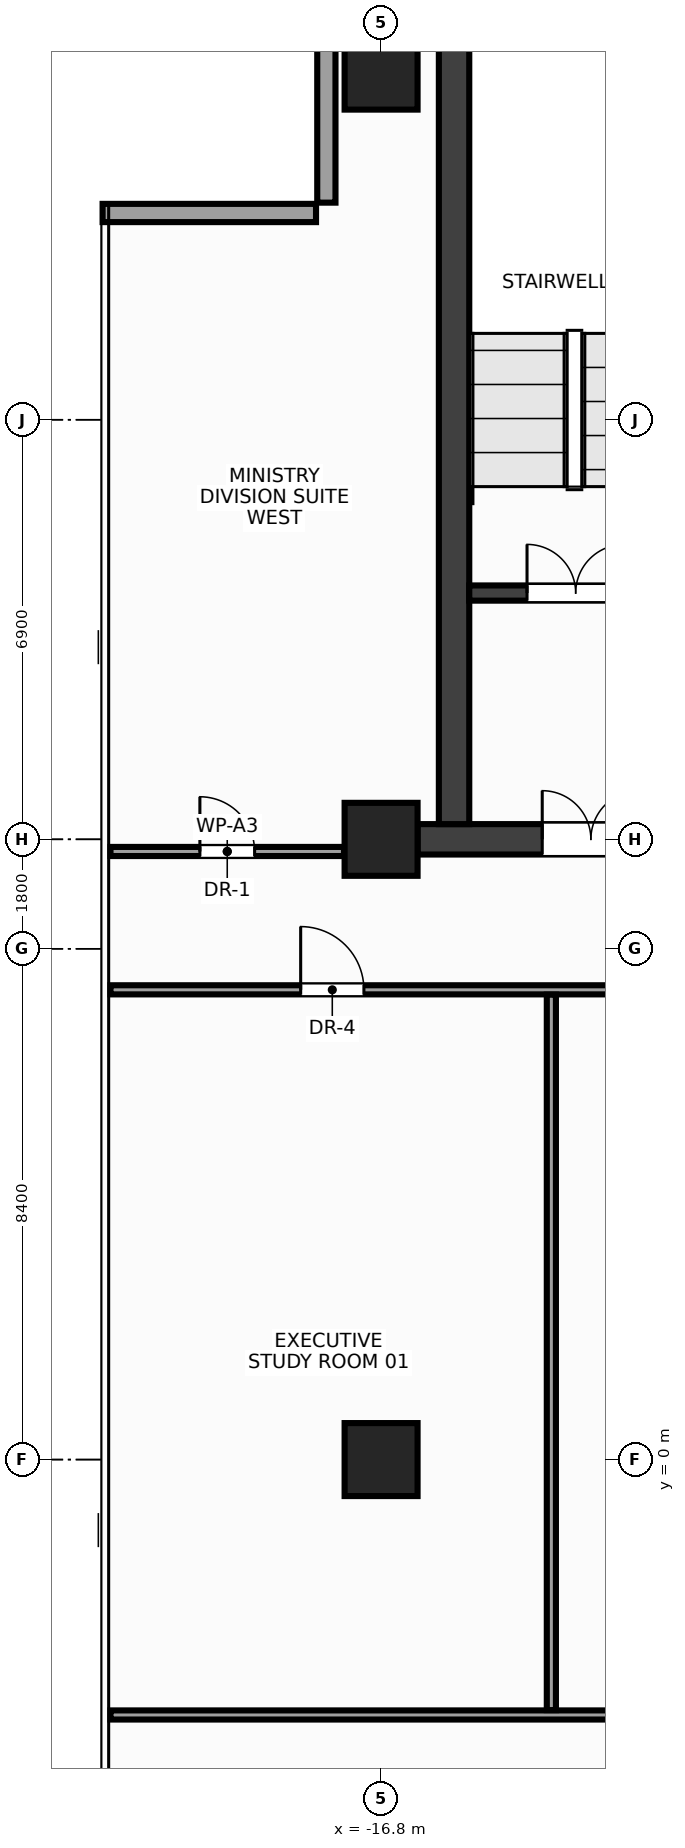
"""IFC4 building model, lengths in metres.
Left out: names, types, materials, properties, quantities, classifications, styles, units other than length and angle.
Written with IfcOpenShell. Run it as: python <this file> out.ifc"""

import sys

from ifc_helpers import new_model, si_unit, direction, frame, frame_2d, origin, origin_2d, place, context, subcontext, project, spatial, rectangle, extrude, source, transform, mapped, element, fill, save


model = new_model("IFC4")
c1 = context("Model", 3, precision=1e-05, world=origin(), true_north=direction((0.0, 1.0)))
c2 = subcontext(c1, "Body", "Model", "MODEL_VIEW")
j1 = project(units=[si_unit("LENGTHUNIT", "METRE"), si_unit("PLANEANGLEUNIT", "RADIAN")], contexts=[c1])
p1 = place(None, origin())
s1 = spatial("IfcSite", under=j1, at=p1, CompositionType="ELEMENT")
p2 = place(p1, origin())
s2 = spatial("IfcBuilding", under=s1, at=p2, CompositionType="ELEMENT")
p3 = place(p2, frame((0.0, 0.0, 279.2)))
s3 = spatial("IfcBuildingStorey", under=s2, at=p3, CompositionType="ELEMENT", Elevation=279.2)
m1 = source(origin(), c2, "Body", "SweptSolid", [
    extrude(rectangle(XDim=32.4, YDim=0.5, at=frame_2d((16.2, 0.0))), origin(), (0.0, 0.0, 1.0), 3.6),
])
p4 = place(p3, frame((-16.2, 10.2, 0.0), z_axis=(0.0, 0.0, 1.0), x_axis=(1.0, 0.0, 0.0)))
e1 = element("IfcWall", 1, at=p4, inside=s3, PredefinedType="SHEAR", context=c2, shape_type="MappedRepresentation", body=[
    mapped(m1, transform((0.0, 0.0, 0.0), x_axis=(1.0, 0.0, 0.0), y_axis=(0.0, 1.0, 0.0), z_axis=(0.0, 0.0, 1.0), scale=1.0)),
])
p5 = place(p4, frame((2.05, 0.0, 0.0)))
e2 = element("IfcOpeningElement", 2, at=p5, cuts=e1, PredefinedType="OPENING", context=c2, shape_type="SweptSolid", body=[
    extrude(rectangle(XDim=1.6, YDim=2.15, at=frame_2d((0.8, 1.075))), frame((0.0, 0.262, 0.0), z_axis=(0.0, -1.0, 0.0), x_axis=(1.0, 0.0, 0.0)), (0.0, 0.0, 1.0), 0.524),
])
p6 = place(p4, frame((28.75, 0.0, 0.0)))
e3 = element("IfcOpeningElement", 3, at=p6, cuts=e1, PredefinedType="OPENING", context=c2, shape_type="SweptSolid", body=[
    extrude(rectangle(XDim=1.6, YDim=2.15, at=frame_2d((0.8, 1.075))), frame((0.0, 0.262, 0.0), z_axis=(0.0, -1.0, 0.0), x_axis=(1.0, 0.0, 0.0)), (0.0, 0.0, 1.0), 0.524),
])
p7 = place(p4, frame((15.45, 0.0, 0.0)))
e4 = element("IfcOpeningElement", 4, at=p7, cuts=e1, PredefinedType="OPENING", context=c2, shape_type="SweptSolid", body=[
    extrude(rectangle(XDim=1.5, YDim=2.2, at=frame_2d((0.75, 1.1))), frame((0.0, 0.262, 0.0), z_axis=(0.0, -1.0, 0.0), x_axis=(1.0, 0.0, 0.0)), (0.0, 0.0, 1.0), 0.524),
])
m2 = source(origin(), c2, "Body", "SweptSolid", [
    extrude(rectangle(XDim=13.1, YDim=0.5, at=frame_2d((6.55, 0.0))), origin(), (0.0, 0.0, 1.0), 3.6),
])
p8 = place(p3, frame((-15.6, 10.45, 0.0), z_axis=(0.0, 0.0, 1.0), x_axis=(0.0, 1.0, 0.0)))
e5 = element("IfcWall", 5, at=p8, inside=s3, PredefinedType="SHEAR", context=c2, shape_type="MappedRepresentation", body=[
    mapped(m2, transform((0.0, 0.0, 0.0), x_axis=(1.0, 0.0, 0.0), y_axis=(0.0, 1.0, 0.0), z_axis=(0.0, 0.0, 1.0), scale=1.0)),
])
m3 = source(origin(), c2, "Body", "SweptSolid", [
    extrude(rectangle(XDim=3.705, YDim=0.25, at=frame_2d((1.853, 0.0))), origin(), (0.0, 0.0, 1.0), 3.6),
])
p9 = place(p3, frame((-15.35, 14.25, 0.0), z_axis=(0.0, 0.0, 1.0), x_axis=(1.0, 0.0, 0.0)))
e6 = element("IfcWall", 6, at=p9, inside=s3, PredefinedType="SHEAR", context=c2, shape_type="MappedRepresentation", body=[
    mapped(m3, transform((0.0, 0.0, 0.0), x_axis=(1.0, 0.0, 0.0), y_axis=(0.0, 1.0, 0.0), z_axis=(0.0, 0.0, 1.0), scale=1.0)),
])
p10 = place(p9, frame((0.95, 0.0, 0.0)))
e7 = element("IfcOpeningElement", 7, at=p10, cuts=e6, PredefinedType="OPENING", context=c2, shape_type="SweptSolid", body=[
    extrude(rectangle(XDim=1.6, YDim=2.15, at=frame_2d((0.8, 1.075))), frame((0.0, 0.137, 0.0), z_axis=(0.0, -1.0, 0.0), x_axis=(1.0, 0.0, 0.0)), (0.0, 0.0, 1.0), 0.274),
])
m4 = source(origin(), c2, "Body", "SweptSolid", [
    extrude(rectangle(XDim=1.2, YDim=1.2, at=origin_2d()), origin(), (0.0, 0.0, 1.0), 3.6),
])
for number, where, z_axis, x_axis in (
    (8, (-16.8, 0.0, 0.0), (0.0, 0.0, 1.0), (1.0, 0.0, 0.0)),
    (9, (-16.8, 10.2, 0.0), (0.0, 0.0, 1.0), (1.0, 0.0, 0.0)),
    (10, (-16.8, 22.8, 0.0), (0.0, 0.0, 1.0), (1.0, 0.0, 0.0)),
):
    element("IfcColumn", number, at=place(p3, frame(where, z_axis=z_axis, x_axis=x_axis)), inside=s3, PredefinedType="COLUMN", context=c2, shape_type="MappedRepresentation", body=[
        mapped(m4, transform((0.0, 0.0, 0.0), x_axis=(1.0, 0.0, 0.0), y_axis=(0.0, 1.0, 0.0), z_axis=(0.0, 0.0, 1.0), scale=1.0)),
    ])
m5 = source(origin(), c2, "Body", "SweptSolid", [
    extrude(rectangle(XDim=3.51, YDim=0.3, at=frame_2d((1.755, 0.0))), origin(), (0.0, 0.0, 1.0), 2.75),
])
p11 = place(p3, frame((-17.7, 24.18, 0.0), z_axis=(0.0, 0.0, 1.0), x_axis=(0.0, -1.0, 0.0)))
e11 = element("IfcWall", 11, at=p11, inside=s3, PredefinedType="STANDARD", context=c2, shape_type="MappedRepresentation", body=[
    mapped(m5, transform((0.0, 0.0, 0.0), x_axis=(1.0, 0.0, 0.0), y_axis=(0.0, 1.0, 0.0), z_axis=(0.0, 0.0, 1.0), scale=1.0)),
])
m6 = source(origin(), c2, "Body", "SweptSolid", [
    extrude(rectangle(XDim=3.51, YDim=0.3, at=frame_2d((1.755, 0.0))), origin(), (0.0, 0.0, 1.0), 2.75),
])
p12 = place(p3, frame((-17.87, 20.5, 0.0), z_axis=(0.0, 0.0, 1.0), x_axis=(-1.0, 0.0, 0.0)))
e12 = element("IfcWall", 12, at=p12, inside=s3, PredefinedType="STANDARD", context=c2, shape_type="MappedRepresentation", body=[
    mapped(m6, transform((0.0, 0.0, 0.0), x_axis=(1.0, 0.0, 0.0), y_axis=(0.0, 1.0, 0.0), z_axis=(0.0, 0.0, 1.0), scale=1.0)),
])
m7 = source(origin(), c2, "Body", "SweptSolid", [
    extrude(rectangle(XDim=3.84, YDim=0.15, at=frame_2d((1.92, 0.0))), origin(), (0.0, 0.0, 1.0), 2.805),
])
p13 = place(p3, frame((-21.25, 10.0, 0.0), z_axis=(0.0, 0.0, 1.0), x_axis=(1.0, 0.0, 0.0)))
e13 = element("IfcWall", 13, at=p13, inside=s3, PredefinedType="PARTITIONING", context=c2, shape_type="MappedRepresentation", body=[
    mapped(m7, transform((0.0, 0.0, 0.0), x_axis=(1.0, 0.0, 0.0), y_axis=(0.0, 1.0, 0.0), z_axis=(0.0, 0.0, 1.0), scale=1.0)),
])
p14 = place(p13, frame((1.47, 0.0, 0.0)))
e14 = element("IfcOpeningElement", 14, at=p14, cuts=e13, PredefinedType="OPENING", context=c2, shape_type="SweptSolid", body=[
    extrude(rectangle(XDim=0.9, YDim=2.15, at=frame_2d((0.45, 1.075))), frame((0.0, 0.087, 0.0), z_axis=(0.0, -1.0, 0.0), x_axis=(1.0, 0.0, 0.0)), (0.0, 0.0, 1.0), 0.174),
])
m8 = source(origin(), c2, "Body", "SweptSolid", [
    extrude(rectangle(XDim=16.9, YDim=0.15, at=frame_2d((8.45, 0.0))), origin(), (0.0, 0.0, 1.0), 2.755),
])
p15 = place(p3, frame((-21.25, 7.725, 0.0), z_axis=(0.0, 0.0, 1.0), x_axis=(1.0, 0.0, 0.0)))
e15 = element("IfcWall", 15, at=p15, inside=s3, PredefinedType="PARTITIONING", context=c2, shape_type="MappedRepresentation", body=[
    mapped(m8, transform((0.0, 0.0, 0.0), x_axis=(1.0, 0.0, 0.0), y_axis=(0.0, 1.0, 0.0), z_axis=(0.0, 0.0, 1.0), scale=1.0)),
])
p16 = place(p15, frame((3.127, 0.0, 0.0)))
e16 = element("IfcOpeningElement", 16, at=p16, cuts=e15, PredefinedType="OPENING", context=c2, shape_type="SweptSolid", body=[
    extrude(rectangle(XDim=1.04, YDim=2.2, at=frame_2d((0.52, 1.1))), frame((0.0, 0.087, 0.0), z_axis=(0.0, -1.0, 0.0), x_axis=(1.0, 0.0, 0.0)), (0.0, 0.0, 1.0), 0.174),
])
p17 = place(p15, frame((11.532, 0.0, 0.0)))
e17 = element("IfcOpeningElement", 17, at=p17, cuts=e15, PredefinedType="OPENING", context=c2, shape_type="SweptSolid", body=[
    extrude(rectangle(XDim=1.04, YDim=2.2, at=frame_2d((0.52, 1.1))), frame((0.0, 0.087, 0.0), z_axis=(0.0, -1.0, 0.0), x_axis=(1.0, 0.0, 0.0)), (0.0, 0.0, 1.0), 0.174),
])
m9 = source(origin(), c2, "Body", "SweptSolid", [
    extrude(rectangle(XDim=16.895, YDim=0.15, at=frame_2d((8.448, 0.0))), origin(), (0.0, 0.0, 1.0), 2.755),
])
p18 = place(p3, frame((-21.25, -4.2, 0.0), z_axis=(0.0, 0.0, 1.0), x_axis=(1.0, 0.0, 0.0)))
e18 = element("IfcWall", 18, at=p18, inside=s3, PredefinedType="PARTITIONING", context=c2, shape_type="MappedRepresentation", body=[
    mapped(m9, transform((0.0, 0.0, 0.0), x_axis=(1.0, 0.0, 0.0), y_axis=(0.0, 1.0, 0.0), z_axis=(0.0, 0.0, 1.0), scale=1.0)),
])
m10 = source(origin(), c2, "Body", "SweptSolid", [
    extrude(rectangle(XDim=11.765, YDim=0.15, at=frame_2d((5.883, 0.0))), origin(), (0.0, 0.0, 1.0), 2.655),
])
p19 = place(p3, frame((-14.0, -4.12, 0.0), z_axis=(0.0, 0.0, 1.0), x_axis=(0.0, 1.0, 0.0)))
e19 = element("IfcWall", 19, at=p19, inside=s3, PredefinedType="PARTITIONING", context=c2, shape_type="MappedRepresentation", body=[
    mapped(m10, transform((0.0, 0.0, 0.0), x_axis=(1.0, 0.0, 0.0), y_axis=(0.0, 1.0, 0.0), z_axis=(0.0, 0.0, 1.0), scale=1.0)),
])
m11 = source(origin(), c2, "Body", "SweptSolid", [
    extrude(rectangle(XDim=1.6, YDim=2.15, at=frame_2d((0.8, 1.075))), frame((0.0, 0.025, 0.0), z_axis=(0.0, -1.0, 0.0), x_axis=(1.0, 0.0, 0.0)), (0.0, 0.0, 1.0), 0.05),
])
p20 = place(p10, origin())
e20 = element("IfcDoor", 20, at=p20, inside=s3, OperationType="DOUBLE_DOOR_SINGLE_SWING", PredefinedType="DOOR", context=c2, shape_type="MappedRepresentation", body=[
    mapped(m11, transform((0.0, 0.0, 0.0), x_axis=(1.0, 0.0, 0.0), y_axis=(0.0, 1.0, 0.0), z_axis=(0.0, 0.0, 1.0), scale=1.0)),
])
fill(e7, e20)
p21 = place(p5, origin())
e21 = element("IfcDoor", 21, at=p21, inside=s3, OperationType="DOUBLE_DOOR_SINGLE_SWING", PredefinedType="DOOR", context=c2, shape_type="MappedRepresentation", body=[
    mapped(m11, transform((0.0, 0.0, 0.0), x_axis=(1.0, 0.0, 0.0), y_axis=(0.0, 1.0, 0.0), z_axis=(0.0, 0.0, 1.0), scale=1.0)),
])
fill(e2, e21)
m12 = source(origin(), c2, "Body", "SweptSolid", [
    extrude(rectangle(XDim=0.9, YDim=2.15, at=frame_2d((0.45, 1.075))), frame((0.0, 0.025, 0.0), z_axis=(0.0, -1.0, 0.0), x_axis=(1.0, 0.0, 0.0)), (0.0, 0.0, 1.0), 0.05),
])
p22 = place(p14, origin())
e22 = element("IfcDoor", 22, at=p22, inside=s3, OperationType="SINGLE_SWING_LEFT", PredefinedType="DOOR", context=c2, shape_type="MappedRepresentation", body=[
    mapped(m12, transform((0.0, 0.0, 0.0), x_axis=(1.0, 0.0, 0.0), y_axis=(0.0, 1.0, 0.0), z_axis=(0.0, 0.0, 1.0), scale=1.0)),
])
fill(e14, e22)
m13 = source(origin(), c2, "Body", "SweptSolid", [
    extrude(rectangle(XDim=1.04, YDim=2.2, at=frame_2d((0.52, 1.1))), frame((0.0, 0.025, 0.0), z_axis=(0.0, -1.0, 0.0), x_axis=(1.0, 0.0, 0.0)), (0.0, 0.0, 1.0), 0.05),
])
p23 = place(p16, origin())
e23 = element("IfcDoor", 23, at=p23, inside=s3, OperationType="SINGLE_SWING_LEFT", PredefinedType="DOOR", context=c2, shape_type="MappedRepresentation", body=[
    mapped(m13, transform((0.0, 0.0, 0.0), x_axis=(1.0, 0.0, 0.0), y_axis=(0.0, 1.0, 0.0), z_axis=(0.0, 0.0, 1.0), scale=1.0)),
])
fill(e16, e23)
save(model, sys.argv[1])
